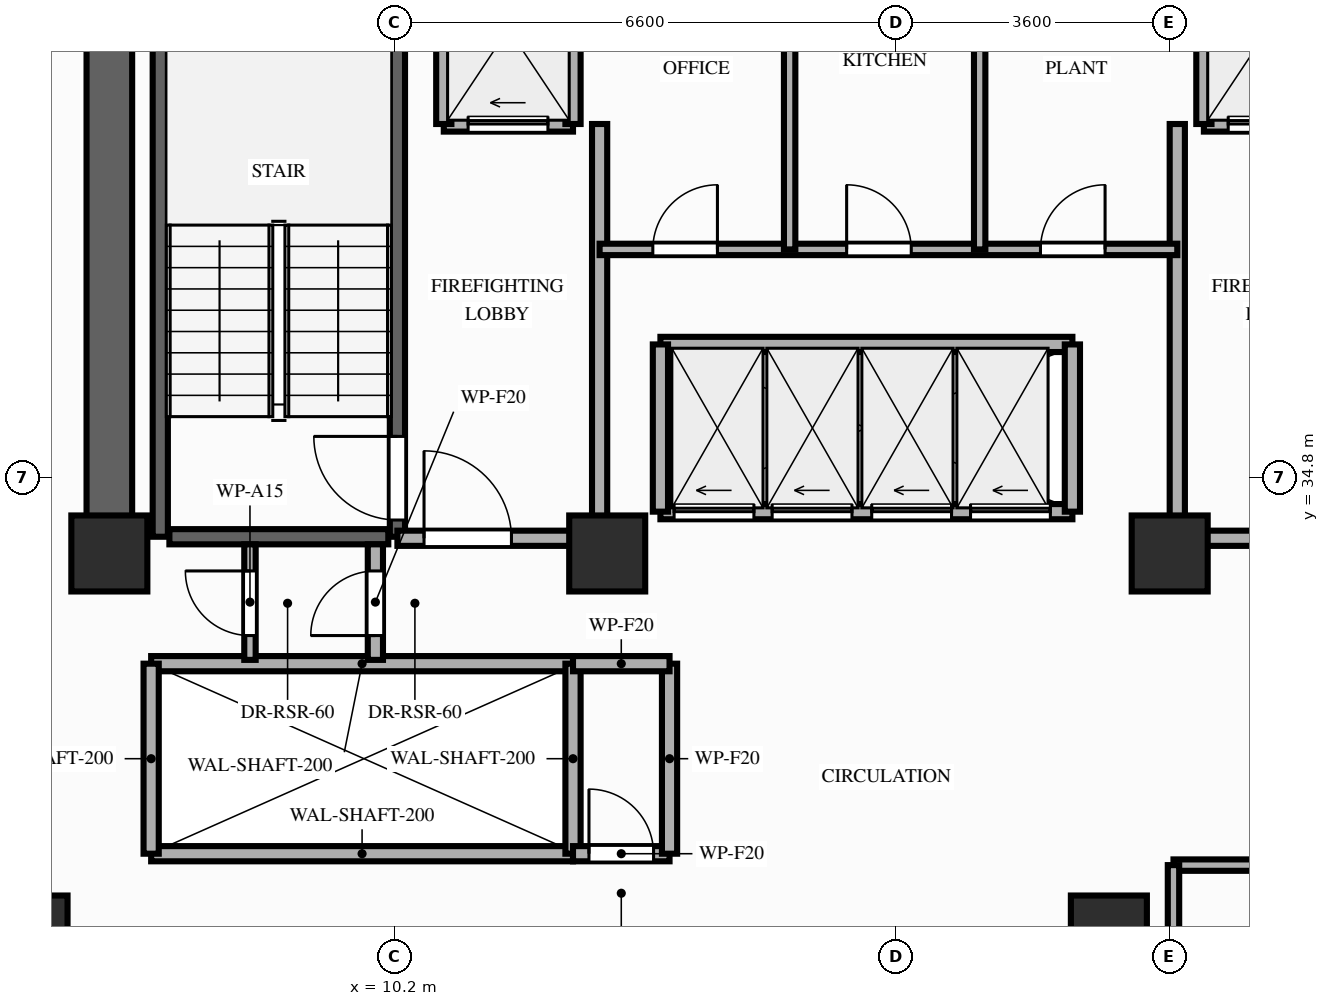
"""IFC4 building model, lengths in metres.
Left out: names, types, materials, properties, quantities, classifications, styles, units other than length and angle.
Written with IfcOpenShell. Run it as: python <this file> out.ifc"""

import sys

from ifc_helpers import new_model, si_unit, direction, frame, frame_2d, origin, origin_2d, place, context, subcontext, project, spatial, rectangle, extrude, element, fill, save


model = new_model("IFC4")
c1 = context("Model", 3, precision=1e-05, world=origin(), true_north=direction((0.0, 1.0)))
c2 = subcontext(c1, "Body", "Model", "MODEL_VIEW")
j1 = project(units=[si_unit("LENGTHUNIT", "METRE"), si_unit("PLANEANGLEUNIT", "RADIAN")], contexts=[c1])
p1 = place(None, origin())
s1 = spatial("IfcSite", under=j1, at=p1, CompositionType="ELEMENT")
p2 = place(p1, origin())
s2 = spatial("IfcBuilding", under=s1, at=p2, CompositionType="ELEMENT")
p3 = place(p2, frame((0.0, 0.0, 113.8)))
s3 = spatial("IfcBuildingStorey", under=s2, at=p3, CompositionType="ELEMENT", Elevation=113.8)
for number, where, z_axis, x_axis in (
    (1, (6.45, 33.8, 0.0), (0.0, 0.0, 1.0), (1.0, 0.0, 0.0)),
    (2, (13.0, 33.8, 0.0), (0.0, 0.0, 1.0), (1.0, 0.0, 0.0)),
    (3, (20.4, 33.8, 0.0), (0.0, 0.0, 1.0), (1.0, 0.0, 0.0)),
    (4, (5.4, 28.8, 0.0), (0.0, 0.0, 1.0), (1.0, 0.0, 0.0)),
    (5, (19.6, 28.8, 0.0), (0.0, 0.0, 1.0), (1.0, 0.0, 0.0)),
):
    element("IfcColumn", number, at=place(p3, frame(where, z_axis=z_axis, x_axis=x_axis)), inside=s3, PredefinedType="COLUMN", context=c2, shape_type="SweptSolid", body=[
        extrude(rectangle(XDim=1.0, YDim=1.0, at=origin_2d()), origin(), (0.0, 0.0, 1.0), 3.2),
    ])
p4 = place(p3, frame((6.45, 33.8, 0.0), z_axis=(0.0, 0.0, 1.0), x_axis=(0.0, 1.0, 0.0)))
e6 = element("IfcWall", 6, at=p4, inside=s3, PredefinedType="SHEAR", context=c2, shape_type="SweptSolid", body=[
    extrude(rectangle(XDim=7.95, YDim=0.6, at=frame_2d((3.975, 0.0))), origin(), (0.0, 0.0, 1.0), 3.02),
])
p5 = place(p3, frame((7.12, 34.02, 0.0), z_axis=(0.0, 0.0, 1.0), x_axis=(0.0, 1.0, 0.0)))
e7 = element("IfcWall", 7, at=p5, inside=s3, PredefinedType="SHEAR", context=c2, shape_type="SweptSolid", body=[
    extrude(rectangle(XDim=7.78, YDim=0.2, at=frame_2d((3.89, 0.0))), origin(), (0.0, 0.0, 1.0), 3.02),
])
p6 = place(p3, frame((10.24, 34.02, 0.0), z_axis=(0.0, 0.0, 1.0), x_axis=(0.0, 1.0, 0.0)))
e8 = element("IfcWall", 8, at=p6, inside=s3, PredefinedType="SHEAR", context=c2, shape_type="SweptSolid", body=[
    extrude(rectangle(XDim=7.78, YDim=0.2, at=frame_2d((3.89, 0.0))), origin(), (0.0, 0.0, 1.0), 3.02),
])
p7 = place(p6, frame((0.22, 0.0, 0.0)))
e9 = element("IfcOpeningElement", 9, at=p7, cuts=e8, PredefinedType="OPENING", context=c2, shape_type="SweptSolid", body=[
    extrude(rectangle(XDim=1.1, YDim=2.15, at=frame_2d((0.55, 1.075))), frame((0.0, 0.11, 0.0), z_axis=(0.0, -1.0, 0.0), x_axis=(1.0, 0.0, 0.0)), (0.0, 0.0, 1.0), 0.22),
])
p8 = place(p3, frame((7.24, 34.02, 0.0), z_axis=(0.0, 0.0, 1.0), x_axis=(1.0, 0.0, 0.0)))
e10 = element("IfcWall", 10, at=p8, inside=s3, PredefinedType="SHEAR", context=c2, shape_type="SweptSolid", body=[
    extrude(rectangle(XDim=2.88, YDim=0.2, at=frame_2d((1.44, 0.0))), origin(), (0.0, 0.0, 1.0), 3.02),
])
for number, where, z_axis, x_axis in (
    (11, (7.0, 29.85, 0.0), (0.0, 0.0, 1.0), (1.0, 0.0, 0.0)),
    (12, (7.0, 32.35, 0.0), (0.0, 0.0, 1.0), (1.0, 0.0, 0.0)),
):
    element("IfcWall", number, at=place(p3, frame(where, z_axis=z_axis, x_axis=x_axis)), inside=s3, PredefinedType="MOVABLE", context=c2, shape_type="SweptSolid", body=[
        extrude(rectangle(XDim=5.55, YDim=0.2, at=frame_2d((2.775, 0.0))), origin(), (0.0, 0.0, 1.0), 3.02),
    ])
for number, where, z_axis, x_axis in (
    (13, (7.0, 29.85, 0.0), (0.0, 0.0, 1.0), (0.0, 1.0, 0.0)),
    (14, (12.55, 29.85, 0.0), (0.0, 0.0, 1.0), (0.0, 1.0, 0.0)),
):
    element("IfcWall", number, at=place(p3, frame(where, z_axis=z_axis, x_axis=x_axis)), inside=s3, PredefinedType="MOVABLE", context=c2, shape_type="SweptSolid", body=[
        extrude(rectangle(XDim=2.5, YDim=0.2, at=frame_2d((1.25, 0.0))), origin(), (0.0, 0.0, 1.0), 3.02),
    ])
p9 = place(p3, frame((10.85, 39.45, 0.0), z_axis=(0.0, 0.0, 1.0), x_axis=(1.0, 0.0, 0.0)))
e15 = element("IfcWall", 15, at=p9, inside=s3, PredefinedType="MOVABLE", context=c2, shape_type="SweptSolid", body=[
    extrude(rectangle(XDim=1.7, YDim=0.2, at=frame_2d((0.85, 0.0))), origin(), (0.0, 0.0, 1.0), 3.02),
])
p10 = place(p9, frame((0.32, 0.0, 0.0)))
e16 = element("IfcOpeningElement", 16, at=p10, cuts=e15, PredefinedType="OPENING", context=c2, shape_type="SweptSolid", body=[
    extrude(rectangle(XDim=1.05, YDim=2.15, at=frame_2d((0.525, 1.075))), frame((0.0, 0.11, 0.0), z_axis=(0.0, -1.0, 0.0), x_axis=(1.0, 0.0, 0.0)), (0.0, 0.0, 1.0), 0.22),
])
p11 = place(p3, frame((20.85, 39.45, 0.0), z_axis=(0.0, 0.0, 1.0), x_axis=(1.0, 0.0, 0.0)))
e17 = element("IfcWall", 17, at=p11, inside=s3, PredefinedType="MOVABLE", context=c2, shape_type="SweptSolid", body=[
    extrude(rectangle(XDim=1.7, YDim=0.2, at=frame_2d((0.85, 0.0))), origin(), (0.0, 0.0, 1.0), 3.02),
])
p12 = place(p11, frame((0.32, 0.0, 0.0)))
e18 = element("IfcOpeningElement", 18, at=p12, cuts=e17, PredefinedType="OPENING", context=c2, shape_type="SweptSolid", body=[
    extrude(rectangle(XDim=1.05, YDim=2.15, at=frame_2d((0.525, 1.075))), frame((0.0, 0.11, 0.0), z_axis=(0.0, -1.0, 0.0), x_axis=(1.0, 0.0, 0.0)), (0.0, 0.0, 1.0), 0.22),
])
for number, where, z_axis, x_axis in (
    (19, (10.85, 39.45, 0.0), (0.0, 0.0, 1.0), (0.0, 1.0, 0.0)),
    (20, (12.55, 39.45, 0.0), (0.0, 0.0, 1.0), (0.0, 1.0, 0.0)),
):
    element("IfcWall", number, at=place(p3, frame(where, z_axis=z_axis, x_axis=x_axis)), inside=s3, PredefinedType="MOVABLE", context=c2, shape_type="SweptSolid", body=[
        extrude(rectangle(XDim=2.65, YDim=0.2, at=frame_2d((1.325, 0.0))), origin(), (0.0, 0.0, 1.0), 2.4),
    ])
p13 = place(p3, frame((12.9, 34.0, 0.0), z_axis=(0.0, 0.0, 1.0), x_axis=(0.0, 1.0, 0.0)))
e21 = element("IfcWall", 21, at=p13, inside=s3, PredefinedType="PARTITIONING", context=c2, shape_type="SweptSolid", body=[
    extrude(rectangle(XDim=5.45, YDim=0.2, at=frame_2d((2.725, 0.0))), origin(), (0.0, 0.0, 1.0), 2.4),
])
p14 = place(p3, frame((10.24, 34.0, 0.0), z_axis=(0.0, 0.0, 1.0), x_axis=(1.0, 0.0, 0.0)))
e22 = element("IfcWall", 22, at=p14, inside=s3, PredefinedType="PARTITIONING", context=c2, shape_type="SweptSolid", body=[
    extrude(rectangle(XDim=2.66, YDim=0.2, at=frame_2d((1.33, 0.0))), origin(), (0.0, 0.0, 1.0), 2.4),
])
p15 = place(p14, frame((0.35, 0.0, 0.0)))
e23 = element("IfcOpeningElement", 23, at=p15, cuts=e22, PredefinedType="OPENING", context=c2, shape_type="SweptSolid", body=[
    extrude(rectangle(XDim=1.15, YDim=2.15, at=frame_2d((0.575, 1.075))), frame((0.0, 0.11, 0.0), z_axis=(0.0, -1.0, 0.0), x_axis=(1.0, 0.0, 0.0)), (0.0, 0.0, 1.0), 0.22),
])
p16 = place(p3, frame((20.85, 39.45, 0.0), z_axis=(0.0, 0.0, 1.0), x_axis=(0.0, 1.0, 0.0)))
e24 = element("IfcWall", 24, at=p16, inside=s3, PredefinedType="MOVABLE", context=c2, shape_type="SweptSolid", body=[
    extrude(rectangle(XDim=2.65, YDim=0.2, at=frame_2d((1.325, 0.0))), origin(), (0.0, 0.0, 1.0), 2.4),
])
p17 = place(p3, frame((20.5, 34.0, 0.0), z_axis=(0.0, 0.0, 1.0), x_axis=(0.0, 1.0, 0.0)))
e25 = element("IfcWall", 25, at=p17, inside=s3, PredefinedType="PARTITIONING", context=c2, shape_type="SweptSolid", body=[
    extrude(rectangle(XDim=5.45, YDim=0.2, at=frame_2d((2.725, 0.0))), origin(), (0.0, 0.0, 1.0), 2.4),
])
p18 = place(p3, frame((20.5, 34.0, 0.0), z_axis=(0.0, 0.0, 1.0), x_axis=(1.0, 0.0, 0.0)))
e26 = element("IfcWall", 26, at=p18, inside=s3, PredefinedType="PARTITIONING", context=c2, shape_type="SweptSolid", body=[
    extrude(rectangle(XDim=2.6, YDim=0.2, at=frame_2d((1.3, 0.0))), origin(), (0.0, 0.0, 1.0), 2.4),
])
p19 = place(p18, frame((1.05, 0.0, 0.0)))
e27 = element("IfcOpeningElement", 27, at=p19, cuts=e26, PredefinedType="OPENING", context=c2, shape_type="SweptSolid", body=[
    extrude(rectangle(XDim=1.15, YDim=2.15, at=frame_2d((0.575, 1.075))), frame((0.0, 0.11, 0.0), z_axis=(0.0, -1.0, 0.0), x_axis=(1.0, 0.0, 0.0)), (0.0, 0.0, 1.0), 0.22),
])
p20 = place(p3, frame((9.95, 32.4, 0.0), z_axis=(0.0, 0.0, 1.0), x_axis=(0.0, 1.0, 0.0)))
e28 = element("IfcWall", 28, at=p20, inside=s3, PredefinedType="PARTITIONING", context=c2, shape_type="SweptSolid", body=[
    extrude(rectangle(XDim=1.52, YDim=0.2, at=frame_2d((0.76, 0.0))), origin(), (0.0, 0.0, 1.0), 2.4),
])
p21 = place(p20, frame((0.32, 0.0, 0.0)))
e29 = element("IfcOpeningElement", 29, at=p21, cuts=e28, PredefinedType="OPENING", context=c2, shape_type="SweptSolid", body=[
    extrude(rectangle(XDim=0.85, YDim=2.05, at=frame_2d((0.425, 1.025))), frame((0.0, 0.11, 0.0), z_axis=(0.0, -1.0, 0.0), x_axis=(1.0, 0.0, 0.0)), (0.0, 0.0, 1.0), 0.22),
])
p22 = place(p3, frame((8.3, 32.4, 0.0), z_axis=(0.0, 0.0, 1.0), x_axis=(0.0, 1.0, 0.0)))
e30 = element("IfcWall", 30, at=p22, inside=s3, PredefinedType="PARTITIONING", context=c2, shape_type="SweptSolid", body=[
    extrude(rectangle(XDim=1.52, YDim=0.15, at=frame_2d((0.76, 0.0))), origin(), (0.0, 0.0, 1.0), 2.4),
])
p23 = place(p22, frame((0.32, 0.0, 0.0)))
e31 = element("IfcOpeningElement", 31, at=p23, cuts=e30, PredefinedType="OPENING", context=c2, shape_type="SweptSolid", body=[
    extrude(rectangle(XDim=0.85, YDim=2.05, at=frame_2d((0.425, 1.025))), frame((0.0, 0.085, 0.0), z_axis=(0.0, -1.0, 0.0), x_axis=(1.0, 0.0, 0.0)), (0.0, 0.0, 1.0), 0.17),
])
p24 = place(p3, frame((12.55, 29.85, 0.0), z_axis=(0.0, 0.0, 1.0), x_axis=(1.0, 0.0, 0.0)))
e32 = element("IfcWall", 32, at=p24, inside=s3, PredefinedType="PARTITIONING", context=c2, shape_type="SweptSolid", body=[
    extrude(rectangle(XDim=1.27, YDim=0.2, at=frame_2d((0.635, 0.0))), origin(), (0.0, 0.0, 1.0), 3.02),
])
p25 = place(p24, frame((0.21, 0.0, 0.0)))
e33 = element("IfcOpeningElement", 33, at=p25, cuts=e32, PredefinedType="OPENING", context=c2, shape_type="SweptSolid", body=[
    extrude(rectangle(XDim=0.85, YDim=2.05, at=frame_2d((0.425, 1.025))), frame((0.0, 0.11, 0.0), z_axis=(0.0, -1.0, 0.0), x_axis=(1.0, 0.0, 0.0)), (0.0, 0.0, 1.0), 0.22),
])
p26 = place(p3, frame((13.82, 29.85, 0.0), z_axis=(0.0, 0.0, 1.0), x_axis=(0.0, 1.0, 0.0)))
e34 = element("IfcWall", 34, at=p26, inside=s3, PredefinedType="PARTITIONING", context=c2, shape_type="SweptSolid", body=[
    extrude(rectangle(XDim=2.5, YDim=0.2, at=frame_2d((1.25, 0.0))), origin(), (0.0, 0.0, 1.0), 3.02),
])
p27 = place(p3, frame((12.55, 32.35, 0.0), z_axis=(0.0, 0.0, 1.0), x_axis=(1.0, 0.0, 0.0)))
e35 = element("IfcWall", 35, at=p27, inside=s3, PredefinedType="PARTITIONING", context=c2, shape_type="SweptSolid", body=[
    extrude(rectangle(XDim=1.27, YDim=0.2, at=frame_2d((0.635, 0.0))), origin(), (0.0, 0.0, 1.0), 3.02),
])
p28 = place(p3, frame((12.9, 37.8, 0.0), z_axis=(0.0, 0.0, 1.0), x_axis=(1.0, 0.0, 0.0)))
e36 = element("IfcWall", 36, at=p28, inside=s3, PredefinedType="PARTITIONING", context=c2, shape_type="SweptSolid", body=[
    extrude(rectangle(XDim=7.6, YDim=0.15, at=frame_2d((3.8, 0.0))), origin(), (0.0, 0.0, 1.0), 3.02),
])
p29 = place(p28, frame((0.7, 0.0, 0.0)))
e37 = element("IfcOpeningElement", 37, at=p29, cuts=e36, PredefinedType="OPENING", context=c2, shape_type="SweptSolid", body=[
    extrude(rectangle(XDim=0.85, YDim=2.05, at=frame_2d((0.425, 1.025))), frame((0.0, 0.085, 0.0), z_axis=(0.0, -1.0, 0.0), x_axis=(1.0, 0.0, 0.0)), (0.0, 0.0, 1.0), 0.17),
])
p30 = place(p28, frame((3.25, 0.0, 0.0)))
e38 = element("IfcOpeningElement", 38, at=p30, cuts=e36, PredefinedType="OPENING", context=c2, shape_type="SweptSolid", body=[
    extrude(rectangle(XDim=0.85, YDim=2.05, at=frame_2d((0.425, 1.025))), frame((0.0, 0.085, 0.0), z_axis=(0.0, -1.0, 0.0), x_axis=(1.0, 0.0, 0.0)), (0.0, 0.0, 1.0), 0.17),
])
p31 = place(p28, frame((5.8, 0.0, 0.0)))
e39 = element("IfcOpeningElement", 39, at=p31, cuts=e36, PredefinedType="OPENING", context=c2, shape_type="SweptSolid", body=[
    extrude(rectangle(XDim=0.85, YDim=2.05, at=frame_2d((0.425, 1.025))), frame((0.0, 0.085, 0.0), z_axis=(0.0, -1.0, 0.0), x_axis=(1.0, 0.0, 0.0)), (0.0, 0.0, 1.0), 0.17),
])
for number, where, z_axis, x_axis in (
    (40, (15.4, 37.8, 0.0), (0.0, 0.0, 1.0), (0.0, 1.0, 0.0)),
    (41, (17.9, 37.8, 0.0), (0.0, 0.0, 1.0), (0.0, 1.0, 0.0)),
):
    element("IfcWall", number, at=place(p3, frame(where, z_axis=z_axis, x_axis=x_axis)), inside=s3, PredefinedType="PARTITIONING", context=c2, shape_type="SweptSolid", body=[
        extrude(rectangle(XDim=4.4, YDim=0.15, at=frame_2d((2.2, 0.0))), origin(), (0.0, 0.0, 1.0), 2.4),
    ])
p32 = place(p3, frame((13.7, 34.35, 0.0), z_axis=(0.0, 0.0, 1.0), x_axis=(1.0, 0.0, 0.0)))
e42 = element("IfcWall", 42, at=p32, inside=s3, PredefinedType="MOVABLE", context=c2, shape_type="SweptSolid", body=[
    extrude(rectangle(XDim=5.42, YDim=0.2, at=frame_2d((2.71, 0.0))), origin(), (0.0, 0.0, 1.0), 3.02),
])
p33 = place(p32, frame((0.18, 0.0, 0.0)))
e43 = element("IfcOpeningElement", 43, at=p33, cuts=e42, PredefinedType="OPENING", context=c2, shape_type="SweptSolid", body=[
    extrude(rectangle(XDim=1.05, YDim=2.15, at=frame_2d((0.525, 1.075))), frame((0.0, 0.11, 0.0), z_axis=(0.0, -1.0, 0.0), x_axis=(1.0, 0.0, 0.0)), (0.0, 0.0, 1.0), 0.22),
])
p34 = place(p32, frame((1.47, 0.0, 0.0)))
e44 = element("IfcOpeningElement", 44, at=p34, cuts=e42, PredefinedType="OPENING", context=c2, shape_type="SweptSolid", body=[
    extrude(rectangle(XDim=1.05, YDim=2.15, at=frame_2d((0.525, 1.075))), frame((0.0, 0.11, 0.0), z_axis=(0.0, -1.0, 0.0), x_axis=(1.0, 0.0, 0.0)), (0.0, 0.0, 1.0), 0.22),
])
p35 = place(p32, frame((2.78, 0.0, 0.0)))
e45 = element("IfcOpeningElement", 45, at=p35, cuts=e42, PredefinedType="OPENING", context=c2, shape_type="SweptSolid", body=[
    extrude(rectangle(XDim=1.05, YDim=2.15, at=frame_2d((0.525, 1.075))), frame((0.0, 0.11, 0.0), z_axis=(0.0, -1.0, 0.0), x_axis=(1.0, 0.0, 0.0)), (0.0, 0.0, 1.0), 0.22),
])
p36 = place(p32, frame((4.08, 0.0, 0.0)))
e46 = element("IfcOpeningElement", 46, at=p36, cuts=e42, PredefinedType="OPENING", context=c2, shape_type="SweptSolid", body=[
    extrude(rectangle(XDim=1.05, YDim=2.15, at=frame_2d((0.525, 1.075))), frame((0.0, 0.11, 0.0), z_axis=(0.0, -1.0, 0.0), x_axis=(1.0, 0.0, 0.0)), (0.0, 0.0, 1.0), 0.22),
])
p37 = place(p3, frame((13.7, 36.55, 0.0), z_axis=(0.0, 0.0, 1.0), x_axis=(1.0, 0.0, 0.0)))
e47 = element("IfcWall", 47, at=p37, inside=s3, PredefinedType="MOVABLE", context=c2, shape_type="SweptSolid", body=[
    extrude(rectangle(XDim=5.42, YDim=0.2, at=frame_2d((2.71, 0.0))), origin(), (0.0, 0.0, 1.0), 3.02),
])
for number, where, z_axis, x_axis in (
    (48, (13.7, 34.35, 0.0), (0.0, 0.0, 1.0), (0.0, 1.0, 0.0)),
    (49, (19.12, 34.35, 0.0), (0.0, 0.0, 1.0), (0.0, 1.0, 0.0)),
):
    element("IfcWall", number, at=place(p3, frame(where, z_axis=z_axis, x_axis=x_axis)), inside=s3, PredefinedType="MOVABLE", context=c2, shape_type="SweptSolid", body=[
        extrude(rectangle(XDim=2.2, YDim=0.2, at=frame_2d((1.1, 0.0))), origin(), (0.0, 0.0, 1.0), 3.02),
    ])
p38 = place(p3, frame((20.45, 29.7, 0.0), z_axis=(0.0, 0.0, 1.0), x_axis=(1.0, 0.0, 0.0)))
e50 = element("IfcWall", 50, at=p38, inside=s3, PredefinedType="PARTITIONING", context=c2, shape_type="SweptSolid", body=[
    extrude(rectangle(XDim=6.7, YDim=0.15, at=frame_2d((3.35, 0.0))), origin(), (0.0, 0.0, 1.0), 3.02),
])
p39 = place(p38, frame((2.8, 0.0, 0.0)))
e51 = element("IfcOpeningElement", 51, at=p39, cuts=e50, PredefinedType="OPENING", context=c2, shape_type="SweptSolid", body=[
    extrude(rectangle(XDim=0.95, YDim=2.15, at=frame_2d((0.475, 1.075))), frame((0.0, 0.085, 0.0), z_axis=(0.0, -1.0, 0.0), x_axis=(1.0, 0.0, 0.0)), (0.0, 0.0, 1.0), 0.17),
])
p40 = place(p3, frame((20.45, 26.75, 0.0), z_axis=(0.0, 0.0, 1.0), x_axis=(0.0, 1.0, 0.0)))
e52 = element("IfcWall", 52, at=p40, inside=s3, PredefinedType="PARTITIONING", context=c2, shape_type="SweptSolid", body=[
    extrude(rectangle(XDim=2.95, YDim=0.15, at=frame_2d((1.475, 0.0))), origin(), (0.0, 0.0, 1.0), 2.4),
])
p41 = place(p7, origin())
e53 = element("IfcDoor", 53, at=p41, inside=s3, OperationType="SINGLE_SWING_RIGHT", PredefinedType="DOOR", context=c2, shape_type="SweptSolid", body=[
    extrude(rectangle(XDim=1.1, YDim=2.15, at=frame_2d((0.55, 1.075))), frame((0.0, 0.025, 0.0), z_axis=(0.0, -1.0, 0.0), x_axis=(1.0, 0.0, 0.0)), (0.0, 0.0, 1.0), 0.05),
])
fill(e9, e53)
p42 = place(p10, origin())
e54 = element("IfcDoor", 54, at=p42, inside=s3, OperationType="SLIDING_TO_LEFT", PredefinedType="DOOR", context=c2, shape_type="SweptSolid", body=[
    extrude(rectangle(XDim=1.05, YDim=2.15, at=frame_2d((0.525, 1.075))), frame((0.0, 0.025, 0.0), z_axis=(0.0, -1.0, 0.0), x_axis=(1.0, 0.0, 0.0)), (0.0, 0.0, 1.0), 0.05),
])
fill(e16, e54)
p43 = place(p12, origin())
e55 = element("IfcDoor", 55, at=p43, inside=s3, OperationType="SLIDING_TO_LEFT", PredefinedType="DOOR", context=c2, shape_type="SweptSolid", body=[
    extrude(rectangle(XDim=1.05, YDim=2.15, at=frame_2d((0.525, 1.075))), frame((0.0, 0.025, 0.0), z_axis=(0.0, -1.0, 0.0), x_axis=(1.0, 0.0, 0.0)), (0.0, 0.0, 1.0), 0.05),
])
fill(e18, e55)
p44 = place(p15, origin())
e56 = element("IfcDoor", 56, at=p44, inside=s3, OperationType="SINGLE_SWING_LEFT", PredefinedType="DOOR", context=c2, shape_type="SweptSolid", body=[
    extrude(rectangle(XDim=1.15, YDim=2.15, at=frame_2d((0.575, 1.075))), frame((0.0, 0.025, 0.0), z_axis=(0.0, -1.0, 0.0), x_axis=(1.0, 0.0, 0.0)), (0.0, 0.0, 1.0), 0.05),
])
fill(e23, e56)
p45 = place(p21, origin())
e57 = element("IfcDoor", 57, at=p45, inside=s3, OperationType="SINGLE_SWING_LEFT", PredefinedType="DOOR", context=c2, shape_type="SweptSolid", body=[
    extrude(rectangle(XDim=0.85, YDim=2.05, at=frame_2d((0.425, 1.025))), frame((0.0, 0.025, 0.0), z_axis=(0.0, -1.0, 0.0), x_axis=(1.0, 0.0, 0.0)), (0.0, 0.0, 1.0), 0.05),
])
fill(e29, e57)
p46 = place(p23, origin())
e58 = element("IfcDoor", 58, at=p46, inside=s3, OperationType="SINGLE_SWING_RIGHT", PredefinedType="DOOR", context=c2, shape_type="SweptSolid", body=[
    extrude(rectangle(XDim=0.85, YDim=2.05, at=frame_2d((0.425, 1.025))), frame((0.0, 0.025, 0.0), z_axis=(0.0, -1.0, 0.0), x_axis=(1.0, 0.0, 0.0)), (0.0, 0.0, 1.0), 0.05),
])
fill(e31, e58)
p47 = place(p25, origin())
e59 = element("IfcDoor", 59, at=p47, inside=s3, OperationType="SINGLE_SWING_LEFT", PredefinedType="DOOR", context=c2, shape_type="SweptSolid", body=[
    extrude(rectangle(XDim=0.85, YDim=2.05, at=frame_2d((0.425, 1.025))), frame((0.0, 0.025, 0.0), z_axis=(0.0, -1.0, 0.0), x_axis=(1.0, 0.0, 0.0)), (0.0, 0.0, 1.0), 0.05),
])
fill(e33, e59)
p48 = place(p29, origin())
e60 = element("IfcDoor", 60, at=p48, inside=s3, OperationType="SINGLE_SWING_RIGHT", PredefinedType="DOOR", context=c2, shape_type="SweptSolid", body=[
    extrude(rectangle(XDim=0.85, YDim=2.05, at=frame_2d((0.425, 1.025))), frame((0.0, 0.025, 0.0), z_axis=(0.0, -1.0, 0.0), x_axis=(1.0, 0.0, 0.0)), (0.0, 0.0, 1.0), 0.05),
])
fill(e37, e60)
p49 = place(p30, origin())
e61 = element("IfcDoor", 61, at=p49, inside=s3, OperationType="SINGLE_SWING_LEFT", PredefinedType="DOOR", context=c2, shape_type="SweptSolid", body=[
    extrude(rectangle(XDim=0.85, YDim=2.05, at=frame_2d((0.425, 1.025))), frame((0.0, 0.025, 0.0), z_axis=(0.0, -1.0, 0.0), x_axis=(1.0, 0.0, 0.0)), (0.0, 0.0, 1.0), 0.05),
])
fill(e38, e61)
p50 = place(p31, origin())
e62 = element("IfcDoor", 62, at=p50, inside=s3, OperationType="SINGLE_SWING_RIGHT", PredefinedType="DOOR", context=c2, shape_type="SweptSolid", body=[
    extrude(rectangle(XDim=0.85, YDim=2.05, at=frame_2d((0.425, 1.025))), frame((0.0, 0.025, 0.0), z_axis=(0.0, -1.0, 0.0), x_axis=(1.0, 0.0, 0.0)), (0.0, 0.0, 1.0), 0.05),
])
fill(e39, e62)
p51 = place(p33, origin())
e63 = element("IfcDoor", 63, at=p51, inside=s3, OperationType="SLIDING_TO_LEFT", PredefinedType="DOOR", context=c2, shape_type="SweptSolid", body=[
    extrude(rectangle(XDim=1.05, YDim=2.15, at=frame_2d((0.525, 1.075))), frame((0.0, 0.025, 0.0), z_axis=(0.0, -1.0, 0.0), x_axis=(1.0, 0.0, 0.0)), (0.0, 0.0, 1.0), 0.05),
])
fill(e43, e63)
p52 = place(p34, origin())
e64 = element("IfcDoor", 64, at=p52, inside=s3, OperationType="SLIDING_TO_LEFT", PredefinedType="DOOR", context=c2, shape_type="SweptSolid", body=[
    extrude(rectangle(XDim=1.05, YDim=2.15, at=frame_2d((0.525, 1.075))), frame((0.0, 0.025, 0.0), z_axis=(0.0, -1.0, 0.0), x_axis=(1.0, 0.0, 0.0)), (0.0, 0.0, 1.0), 0.05),
])
fill(e44, e64)
p53 = place(p35, origin())
e65 = element("IfcDoor", 65, at=p53, inside=s3, OperationType="SLIDING_TO_LEFT", PredefinedType="DOOR", context=c2, shape_type="SweptSolid", body=[
    extrude(rectangle(XDim=1.05, YDim=2.15, at=frame_2d((0.525, 1.075))), frame((0.0, 0.025, 0.0), z_axis=(0.0, -1.0, 0.0), x_axis=(1.0, 0.0, 0.0)), (0.0, 0.0, 1.0), 0.05),
])
fill(e45, e65)
p54 = place(p36, origin())
e66 = element("IfcDoor", 66, at=p54, inside=s3, OperationType="SLIDING_TO_LEFT", PredefinedType="DOOR", context=c2, shape_type="SweptSolid", body=[
    extrude(rectangle(XDim=1.05, YDim=2.15, at=frame_2d((0.525, 1.075))), frame((0.0, 0.025, 0.0), z_axis=(0.0, -1.0, 0.0), x_axis=(1.0, 0.0, 0.0)), (0.0, 0.0, 1.0), 0.05),
])
fill(e46, e66)
save(model, sys.argv[1])
